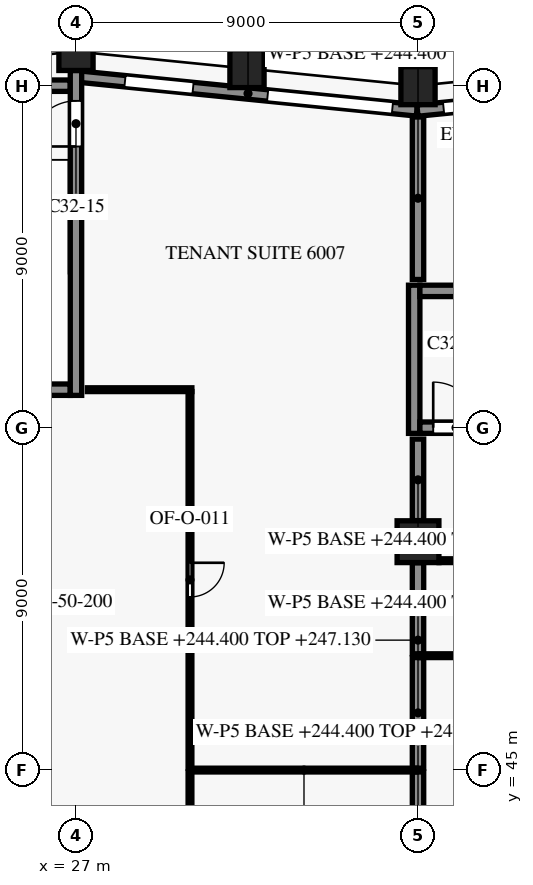
"""IFC4 building model, lengths in metres.
Left out: names, types, materials, properties, quantities, classifications, styles, units other than length and angle.
Written with IfcOpenShell. Run it as: python <this file> out.ifc"""

import sys

from ifc_helpers import new_model, si_unit, direction, frame, frame_2d, origin, origin_2d, place, context, subcontext, project, spatial, rectangle, extrude, element, fill, save


model = new_model("IFC4")
c1 = context("Model", 3, precision=1e-05, world=origin(), true_north=direction((0.0, 1.0)))
c2 = subcontext(c1, "Body", "Model", "MODEL_VIEW")
j1 = project(units=[si_unit("LENGTHUNIT", "METRE"), si_unit("PLANEANGLEUNIT", "RADIAN")], contexts=[c1])
p1 = place(None, origin())
s1 = spatial("IfcSite", under=j1, at=p1, CompositionType="ELEMENT")
p2 = place(p1, origin())
s2 = spatial("IfcBuilding", under=s1, at=p2, CompositionType="ELEMENT")
p3 = place(p2, frame((0.0, 0.0, 244.4)))
s3 = spatial("IfcBuildingStorey", under=s2, at=p3, CompositionType="ELEMENT", Elevation=244.4)
for number, where, z_axis, x_axis in (
    (1, (36.0, 63.0, 0.0), (0.0, 0.0, 1.0), (-1.0, 0.0, 0.0)),
    (2, (31.5, 63.45, 0.0), (0.0, 0.0, 1.0), (-0.995, 0.1, 0.0)),
    (3, (27.0, 63.9, 0.0), (0.0, 0.0, 1.0), (-1.0, 0.0, 0.0)),
):
    element("IfcColumn", number, at=place(p3, frame(where, z_axis=z_axis, x_axis=x_axis)), inside=s3, PredefinedType="COLUMN", context=c2, shape_type="SweptSolid", body=[
        extrude(rectangle(XDim=0.9, YDim=1.0, at=origin_2d()), origin(), (0.0, 0.0, 1.0), 3.8),
    ])
p4 = place(p3, frame((36.0, 51.0, 0.0), z_axis=(0.0, 0.0, 1.0), x_axis=(1.0, 0.0, 0.0)))
e4 = element("IfcColumn", 4, at=p4, inside=s3, PredefinedType="COLUMN", context=c2, shape_type="SweptSolid", body=[
    extrude(rectangle(XDim=1.1, YDim=1.1, at=origin_2d()), origin(), (0.0, 0.0, 1.0), 3.8),
])
p5 = place(p3, frame((35.985, 62.345, 0.0), z_axis=(0.0, 0.0, 1.0), x_axis=(0.995035316196, 0.099522457379, 0.0)))
e5 = element("IfcWall", 5, at=p5, inside=s3, PredefinedType="SOLIDWALL", context=c2, shape_type="SweptSolid", body=[
    extrude(rectangle(XDim=9.03, YDim=0.3, at=frame_2d((4.515, 0.0))), origin(), (0.0, 0.0, 1.0), 3.0),
])
p6 = place(p5, frame((0.691, 0.0, 0.15)))
e6 = element("IfcOpeningElement", 6, at=p6, cuts=e5, PredefinedType="OPENING", context=c2, shape_type="SweptSolid", body=[
    extrude(rectangle(XDim=3.3, YDim=2.4, at=frame_2d((1.65, 1.2))), frame((0.0, 0.16, 0.0), z_axis=(0.0, -1.0, 0.0), x_axis=(1.0, 0.0, 0.0)), (0.0, 0.0, 1.0), 0.32),
])
p7 = place(p5, frame((5.964, 0.0, 0.75)))
e7 = element("IfcOpeningElement", 7, at=p7, cuts=e5, PredefinedType="OPENING", context=c2, shape_type="SweptSolid", body=[
    extrude(rectangle(XDim=1.8, YDim=1.8, at=frame_2d((0.9, 0.9))), frame((0.0, 0.16, 0.0), z_axis=(0.0, -1.0, 0.0), x_axis=(1.0, 0.0, 0.0)), (0.0, 0.0, 1.0), 0.32),
])
p8 = place(p3, frame((27.085, 63.238, 0.0), z_axis=(0.0, 0.0, 1.0), x_axis=(0.995035836657, -0.099517253618, 0.0)))
e8 = element("IfcWall", 8, at=p8, inside=s3, PredefinedType="SOLIDWALL", context=c2, shape_type="SweptSolid", body=[
    extrude(rectangle(XDim=8.93, YDim=0.3, at=frame_2d((4.465, 0.0))), origin(), (0.0, 0.0, 1.0), 3.0),
])
p9 = place(p8, frame((1.211, 0.0, 0.75)))
e9 = element("IfcOpeningElement", 9, at=p9, cuts=e8, PredefinedType="OPENING", context=c2, shape_type="SweptSolid", body=[
    extrude(rectangle(XDim=1.8, YDim=1.8, at=frame_2d((0.9, 0.9))), frame((0.0, 0.16, 0.0), z_axis=(0.0, -1.0, 0.0), x_axis=(1.0, 0.0, 0.0)), (0.0, 0.0, 1.0), 0.32),
])
p10 = place(p8, frame((4.984, 0.0, 0.15)))
e10 = element("IfcOpeningElement", 10, at=p10, cuts=e8, PredefinedType="OPENING", context=c2, shape_type="SweptSolid", body=[
    extrude(rectangle(XDim=3.3, YDim=2.4, at=frame_2d((1.65, 1.2))), frame((0.0, 0.16, 0.0), z_axis=(0.0, -1.0, 0.0), x_axis=(1.0, 0.0, 0.0)), (0.0, 0.0, 1.0), 0.32),
])
p11 = place(p3, frame((36.05, 54.0, 0.0), z_axis=(0.0, 0.0, 1.0), x_axis=(1.0, 0.0, 0.0)))
e11 = element("IfcWall", 11, at=p11, inside=s3, PredefinedType="SHEAR", context=c2, shape_type="SweptSolid", body=[
    extrude(rectangle(XDim=7.7, YDim=0.3, at=frame_2d((3.85, 0.0))), origin(), (0.0, 0.0, 1.0), 3.5),
])
p12 = place(p11, frame((0.35, 0.0, 0.0)))
e12 = element("IfcOpeningElement", 12, at=p12, cuts=e11, PredefinedType="OPENING", context=c2, shape_type="SweptSolid", body=[
    extrude(rectangle(XDim=1.2, YDim=2.2, at=frame_2d((0.6, 1.1))), frame((0.0, 0.16, 0.0), z_axis=(0.0, -1.0, 0.0), x_axis=(1.0, 0.0, 0.0)), (0.0, 0.0, 1.0), 0.32),
])
p13 = place(p3, frame((23.4, 55.0, 0.0), z_axis=(0.0, 0.0, 1.0), x_axis=(1.0, 0.0, 0.0)))
e13 = element("IfcWall", 13, at=p13, inside=s3, PredefinedType="SHEAR", context=c2, shape_type="SweptSolid", body=[
    extrude(rectangle(XDim=3.45, YDim=0.3, at=frame_2d((1.725, 0.0))), origin(), (0.0, 0.0, 1.0), 3.5),
])
p14 = place(p3, frame((36.05, 57.6, 0.0), z_axis=(0.0, 0.0, 1.0), x_axis=(1.0, 0.0, 0.0)))
e14 = element("IfcWall", 14, at=p14, inside=s3, PredefinedType="SHEAR", context=c2, shape_type="SweptSolid", body=[
    extrude(rectangle(XDim=7.7, YDim=0.3, at=frame_2d((3.85, 0.0))), origin(), (0.0, 0.0, 1.0), 3.5),
])
p15 = place(p3, frame((23.55, 63.0, 0.0), z_axis=(0.0, 0.0, 1.0), x_axis=(1.0, 0.0, 0.0)))
e15 = element("IfcWall", 15, at=p15, inside=s3, PredefinedType="SHEAR", context=c2, shape_type="SweptSolid", body=[
    extrude(rectangle(XDim=3.3, YDim=0.3, at=frame_2d((1.65, 0.0))), origin(), (0.0, 0.0, 1.0), 3.5),
])
p16 = place(p3, frame((27.0, 54.85, 0.0), z_axis=(0.0, 0.0, 1.0), x_axis=(0.0, 1.0, 0.0)))
e16 = element("IfcWall", 16, at=p16, inside=s3, PredefinedType="SHEAR", context=c2, shape_type="SweptSolid", body=[
    extrude(rectangle(XDim=8.55, YDim=0.3, at=frame_2d((4.275, 0.0))), origin(), (0.0, 0.0, 1.0), 3.5),
])
p17 = place(p16, frame((6.55, 0.0, 0.0)))
e17 = element("IfcOpeningElement", 17, at=p17, cuts=e16, PredefinedType="OPENING", context=c2, shape_type="SweptSolid", body=[
    extrude(rectangle(XDim=1.2, YDim=2.2, at=frame_2d((0.6, 1.1))), frame((0.0, 0.16, 0.0), z_axis=(0.0, -1.0, 0.0), x_axis=(1.0, 0.0, 0.0)), (0.0, 0.0, 1.0), 0.32),
])
p18 = place(p3, frame((35.9, 53.85, 0.0), z_axis=(0.0, 0.0, 1.0), x_axis=(0.0, 1.0, 0.0)))
e18 = element("IfcWall", 18, at=p18, inside=s3, PredefinedType="SHEAR", context=c2, shape_type="SweptSolid", body=[
    extrude(rectangle(XDim=3.9, YDim=0.3, at=frame_2d((1.95, 0.0))), origin(), (0.0, 0.0, 1.0), 3.5),
])
p19 = place(p3, frame((36.0, 40.455, 0.0), z_axis=(0.0, 0.0, 1.0), x_axis=(0.0, 1.0, 0.0)))
e19 = element("IfcWall", 19, at=p19, inside=s3, PredefinedType="PARTITIONING", context=c2, shape_type="SweptSolid", body=[
    extrude(rectangle(XDim=4.485, YDim=0.3, at=frame_2d((2.242, 0.0))), origin(), (0.0, 0.0, 1.0), 2.73),
])
p20 = place(p3, frame((30.0, 44.94, 0.0), z_axis=(0.0, 0.0, 1.0), x_axis=(0.0, -1.0, 0.0)))
e20 = element("IfcWall", 20, at=p20, inside=s3, PredefinedType="PARTITIONING", context=c2, shape_type="SweptSolid", body=[
    extrude(rectangle(XDim=11.89, YDim=0.1, at=frame_2d((5.945, 0.0))), origin(), (0.0, 0.0, 1.0), 3.33),
])
p21 = place(p3, frame((30.05, 44.99, 0.0), z_axis=(0.0, 0.0, 1.0), x_axis=(1.0, 0.0, 0.0)))
e21 = element("IfcWall", 21, at=p21, inside=s3, PredefinedType="PARTITIONING", context=c2, shape_type="SweptSolid", body=[
    extrude(rectangle(XDim=5.9, YDim=0.1, at=frame_2d((2.95, 0.0))), origin(), (0.0, 0.0, 1.0), 2.73),
])
p22 = place(p3, frame((36.0, 45.04, 0.0), z_axis=(0.0, 0.0, 1.0), x_axis=(0.0, 1.0, 0.0)))
e22 = element("IfcWall", 22, at=p22, inside=s3, PredefinedType="PARTITIONING", context=c2, shape_type="SweptSolid", body=[
    extrude(rectangle(XDim=2.91, YDim=0.3, at=frame_2d((1.455, 0.0))), origin(), (0.0, 0.0, 1.0), 2.73),
])
p23 = place(p3, frame((36.05, 48.0, 0.0), z_axis=(0.0, 0.0, 1.0), x_axis=(1.0, 0.0, 0.0)))
e23 = element("IfcWall", 23, at=p23, inside=s3, PredefinedType="PARTITIONING", context=c2, shape_type="SweptSolid", body=[
    extrude(rectangle(XDim=3.75, YDim=0.1, at=frame_2d((1.875, 0.0))), origin(), (0.0, 0.0, 1.0), 2.73),
])
p24 = place(p23, frame((1.4, 0.0, 0.0)))
e24 = element("IfcOpeningElement", 24, at=p24, cuts=e23, PredefinedType="OPENING", context=c2, shape_type="SweptSolid", body=[
    extrude(rectangle(XDim=0.9, YDim=2.1, at=frame_2d((0.45, 1.05))), frame((0.0, 0.06, 0.0), z_axis=(0.0, -1.0, 0.0), x_axis=(1.0, 0.0, 0.0)), (0.0, 0.0, 1.0), 0.12),
])
p25 = place(p3, frame((36.0, 48.05, 0.0), z_axis=(0.0, 0.0, 1.0), x_axis=(0.0, 1.0, 0.0)))
e25 = element("IfcWall", 25, at=p25, inside=s3, PredefinedType="PARTITIONING", context=c2, shape_type="SweptSolid", body=[
    extrude(rectangle(XDim=2.395, YDim=0.3, at=frame_2d((1.198, 0.0))), origin(), (0.0, 0.0, 1.0), 2.73),
])
p26 = place(p3, frame((44.445, 50.5, 0.0), z_axis=(0.0, 0.0, 1.0), x_axis=(-1.0, 0.0, 0.0)))
e26 = element("IfcWall", 26, at=p26, inside=s3, PredefinedType="PARTITIONING", context=c2, shape_type="SweptSolid", body=[
    extrude(rectangle(XDim=7.89, YDim=0.1, at=frame_2d((3.945, 0.0))), origin(), (0.0, 0.0, 1.0), 3.33),
])
p27 = place(p3, frame((36.0, 51.555, 0.0), z_axis=(0.0, 0.0, 1.0), x_axis=(0.0, 1.0, 0.0)))
e27 = element("IfcWall", 27, at=p27, inside=s3, PredefinedType="PARTITIONING", context=c2, shape_type="SweptSolid", body=[
    extrude(rectangle(XDim=2.145, YDim=0.3, at=frame_2d((1.073, 0.0))), origin(), (0.0, 0.0, 1.0), 2.73),
])
p28 = place(p3, frame((30.0, 54.95, 0.0), z_axis=(0.0, 0.0, 1.0), x_axis=(0.0, -1.0, 0.0)))
e28 = element("IfcWall", 28, at=p28, inside=s3, PredefinedType="PARTITIONING", context=c2, shape_type="SweptSolid", body=[
    extrude(rectangle(XDim=9.91, YDim=0.1, at=frame_2d((4.955, 0.0))), origin(), (0.0, 0.0, 1.0), 3.33),
])
p29 = place(p28, frame((4.505, 0.0, 0.0)))
e29 = element("IfcOpeningElement", 29, at=p29, cuts=e28, PredefinedType="OPENING", context=c2, shape_type="SweptSolid", body=[
    extrude(rectangle(XDim=0.9, YDim=2.1, at=frame_2d((0.45, 1.05))), frame((0.0, 0.06, 0.0), z_axis=(0.0, -1.0, 0.0), x_axis=(1.0, 0.0, 0.0)), (0.0, 0.0, 1.0), 0.12),
])
p30 = place(p3, frame((27.3, 55.0, 0.0), z_axis=(0.0, 0.0, 1.0), x_axis=(1.0, 0.0, 0.0)))
e30 = element("IfcWall", 30, at=p30, inside=s3, PredefinedType="PARTITIONING", context=c2, shape_type="SweptSolid", body=[
    extrude(rectangle(XDim=2.75, YDim=0.1, at=frame_2d((1.375, 0.0))), origin(), (0.0, 0.0, 1.0), 3.33),
])
p31 = place(p3, frame((36.0, 57.9, 0.0), z_axis=(0.0, 0.0, 1.0), x_axis=(0.0, 1.0, 0.0)))
e31 = element("IfcWall", 31, at=p31, inside=s3, PredefinedType="PARTITIONING", context=c2, shape_type="SweptSolid", body=[
    extrude(rectangle(XDim=4.276, YDim=0.3, at=frame_2d((2.138, 0.0))), origin(), (0.0, 0.0, 1.0), 2.73),
])
p32 = place(p6, origin())
e32 = element("IfcWindow", 32, at=p32, inside=s3, PartitioningType="SINGLE_PANEL", PredefinedType="WINDOW", context=c2, shape_type="SweptSolid", body=[
    extrude(rectangle(XDim=3.3, YDim=2.4, at=frame_2d((1.65, 1.2))), frame((0.0, 0.03, 0.0), z_axis=(0.0, -1.0, 0.0), x_axis=(1.0, 0.0, 0.0)), (0.0, 0.0, 1.0), 0.06),
])
fill(e6, e32)
p33 = place(p9, origin())
e33 = element("IfcWindow", 33, at=p33, inside=s3, PartitioningType="SINGLE_PANEL", PredefinedType="WINDOW", context=c2, shape_type="SweptSolid", body=[
    extrude(rectangle(XDim=1.8, YDim=1.8, at=frame_2d((0.9, 0.9))), frame((0.0, 0.03, 0.0), z_axis=(0.0, -1.0, 0.0), x_axis=(1.0, 0.0, 0.0)), (0.0, 0.0, 1.0), 0.06),
])
fill(e9, e33)
p34 = place(p10, origin())
e34 = element("IfcWindow", 34, at=p34, inside=s3, PartitioningType="SINGLE_PANEL", PredefinedType="WINDOW", context=c2, shape_type="SweptSolid", body=[
    extrude(rectangle(XDim=3.3, YDim=2.4, at=frame_2d((1.65, 1.2))), frame((0.0, 0.03, 0.0), z_axis=(0.0, -1.0, 0.0), x_axis=(1.0, 0.0, 0.0)), (0.0, 0.0, 1.0), 0.06),
])
fill(e10, e34)
p35 = place(p17, origin())
e35 = element("IfcDoor", 35, at=p35, inside=s3, OperationType="SINGLE_SWING_LEFT", PredefinedType="DOOR", context=c2, shape_type="SweptSolid", body=[
    extrude(rectangle(XDim=1.2, YDim=2.2, at=frame_2d((0.6, 1.1))), frame((0.0, 0.025, 0.0), z_axis=(0.0, -1.0, 0.0), x_axis=(1.0, 0.0, 0.0)), (0.0, 0.0, 1.0), 0.05),
])
fill(e17, e35)
p36 = place(p12, origin())
e36 = element("IfcDoor", 36, at=p36, inside=s3, OperationType="SINGLE_SWING_LEFT", PredefinedType="DOOR", context=c2, shape_type="SweptSolid", body=[
    extrude(rectangle(XDim=1.2, YDim=2.2, at=frame_2d((0.6, 1.1))), frame((0.0, 0.025, 0.0), z_axis=(0.0, -1.0, 0.0), x_axis=(1.0, 0.0, 0.0)), (0.0, 0.0, 1.0), 0.05),
])
fill(e12, e36)
p37 = place(p29, origin())
e37 = element("IfcDoor", 37, at=p37, inside=s3, OperationType="SINGLE_SWING_LEFT", PredefinedType="DOOR", context=c2, shape_type="SweptSolid", body=[
    extrude(rectangle(XDim=0.9, YDim=2.1, at=frame_2d((0.45, 1.05))), frame((0.0, 0.025, 0.0), z_axis=(0.0, -1.0, 0.0), x_axis=(1.0, 0.0, 0.0)), (0.0, 0.0, 1.0), 0.05),
])
fill(e29, e37)
save(model, sys.argv[1])
